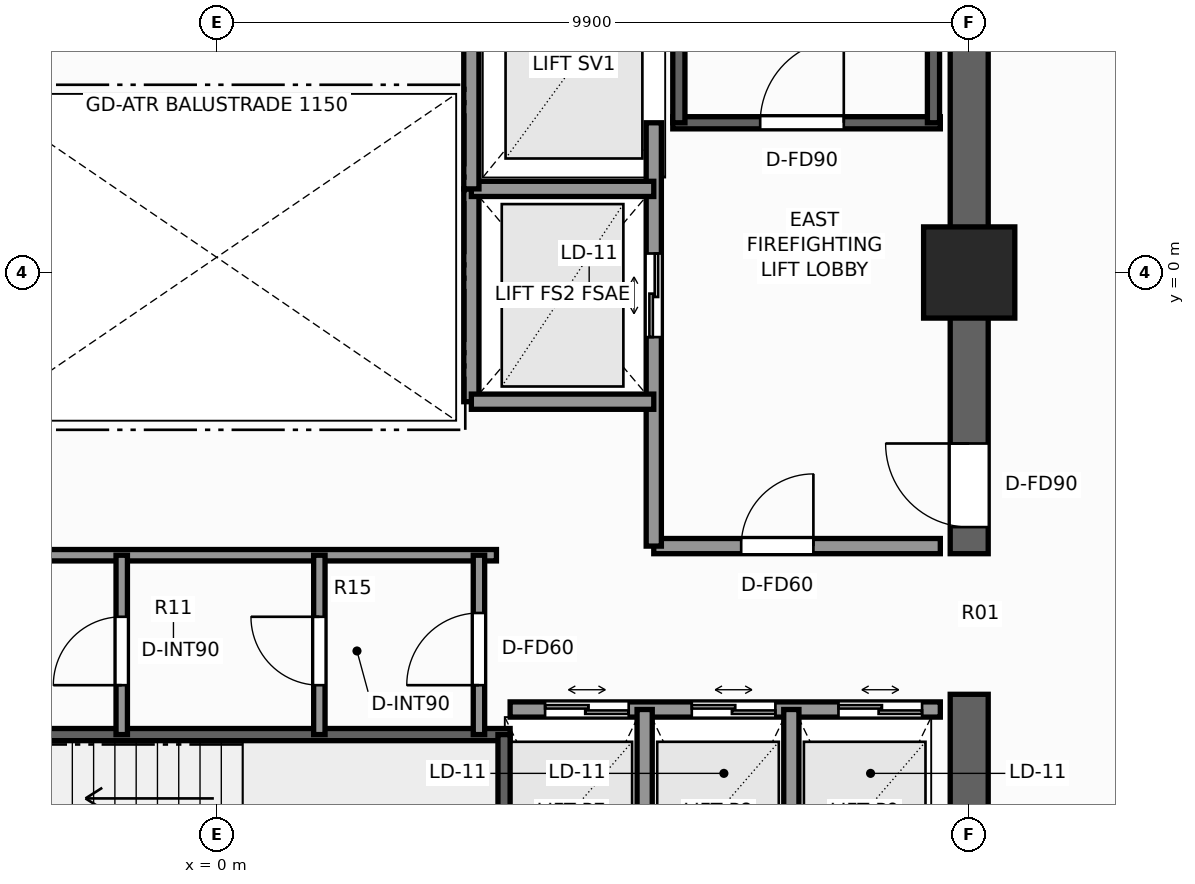
"""IFC4 building model, lengths in metres.
Left out: names, types, materials, properties, quantities, classifications, styles, units other than length and angle.
Written with IfcOpenShell. Run it as: python <this file> out.ifc"""

import sys

from ifc_helpers import new_model, si_unit, direction, frame, frame_2d, origin, origin_2d, place, context, subcontext, project, spatial, rectangle, extrude, element, fill, save


model = new_model("IFC4")
c1 = context("Model", 3, precision=1e-05, world=origin(), true_north=direction((0.0, 1.0)))
c2 = subcontext(c1, "Body", "Model", "MODEL_VIEW")
j1 = project(units=[si_unit("LENGTHUNIT", "METRE"), si_unit("PLANEANGLEUNIT", "RADIAN")], contexts=[c1])
p1 = place(None, origin())
s1 = spatial("IfcSite", under=j1, at=p1, CompositionType="ELEMENT")
p2 = place(p1, origin())
s2 = spatial("IfcBuilding", under=s1, at=p2, CompositionType="ELEMENT")
p3 = place(p2, frame((0.0, 0.0, 183.3)))
s3 = spatial("IfcBuildingStorey", under=s2, at=p3, CompositionType="ELEMENT", Elevation=183.3)
p4 = place(p3, frame((9.9, -9.65, 0.0), z_axis=(0.0, 0.0, 1.0), x_axis=(0.0, 1.0, 0.0)))
e1 = element("IfcWall", 1, at=p4, inside=s3, PredefinedType="SHEAR", context=c2, shape_type="SweptSolid", body=[
    extrude(rectangle(XDim=4.1, YDim=0.5, at=frame_2d((2.05, 0.0))), origin(), (0.0, 0.0, 1.0), 3.3),
])
p5 = place(p3, frame((9.9, -3.7, 0.0), z_axis=(0.0, 0.0, 1.0), x_axis=(0.0, 1.0, 0.0)))
e2 = element("IfcWall", 2, at=p5, inside=s3, PredefinedType="SHEAR", context=c2, shape_type="SweptSolid", body=[
    extrude(rectangle(XDim=13.35, YDim=0.5, at=frame_2d((6.675, 0.0))), origin(), (0.0, 0.0, 1.0), 3.3),
])
p6 = place(p5, frame((0.35, 0.0, 0.0)))
e3 = element("IfcOpeningElement", 3, at=p6, cuts=e2, PredefinedType="OPENING", context=c2, shape_type="SweptSolid", body=[
    extrude(rectangle(XDim=1.1, YDim=2.2, at=frame_2d((0.55, 1.1))), frame((0.0, 0.26, 0.0), z_axis=(0.0, -1.0, 0.0), x_axis=(1.0, 0.0, 0.0)), (0.0, 0.0, 1.0), 0.52),
])
p7 = place(p3, frame((9.9, 0.0, 0.0), z_axis=(0.0, 0.0, 1.0), x_axis=(1.0, 0.0, 0.0)))
e4 = element("IfcColumn", 4, at=p7, inside=s3, PredefinedType="COLUMN", context=c2, shape_type="SweptSolid", body=[
    extrude(rectangle(XDim=1.2, YDim=1.2, at=origin_2d()), origin(), (0.0, 0.0, 1.0), 3.3),
])
p8 = place(p3, frame((6.0, 1.97, 0.0), z_axis=(0.0, 0.0, 1.0), x_axis=(1.0, 0.0, 0.0)))
e5 = element("IfcWall", 5, at=p8, inside=s3, PredefinedType="SHEAR", context=c2, shape_type="SweptSolid", body=[
    extrude(rectangle(XDim=3.52, YDim=0.16, at=frame_2d((1.76, 0.0))), origin(), (0.0, 0.0, 1.0), 3.3),
])
p9 = place(p8, frame((1.15, 0.0, 0.0)))
e6 = element("IfcOpeningElement", 6, at=p9, cuts=e5, PredefinedType="OPENING", context=c2, shape_type="SweptSolid", body=[
    extrude(rectangle(XDim=1.1, YDim=2.2, at=frame_2d((0.55, 1.1))), frame((0.0, 0.09, 0.0), z_axis=(0.0, -1.0, 0.0), x_axis=(1.0, 0.0, 0.0)), (0.0, 0.0, 1.0), 0.18),
])
for number, where, z_axis, x_axis in (
    (7, (6.08, 1.97, 0.0), (0.0, 0.0, 1.0), (0.0, 1.0, 0.0)),
    (8, (9.43, 1.97, 0.0), (0.0, 0.0, 1.0), (0.0, 1.0, 0.0)),
):
    element("IfcWall", number, at=place(p3, frame(where, z_axis=z_axis, x_axis=x_axis)), inside=s3, PredefinedType="SHEAR", context=c2, shape_type="SweptSolid", body=[
        extrude(rectangle(XDim=7.56, YDim=0.16, at=frame_2d((3.78, 0.0))), origin(), (0.0, 0.0, 1.0), 3.3),
    ])
p10 = place(p3, frame((-3.86, -6.08, 0.0), z_axis=(0.0, 0.0, 1.0), x_axis=(1.0, 0.0, 0.0)))
e9 = element("IfcWall", 9, at=p10, inside=s3, PredefinedType="SHEAR", context=c2, shape_type="SweptSolid", body=[
    extrude(rectangle(XDim=7.72, YDim=0.16, at=frame_2d((3.86, 0.0))), origin(), (0.0, 0.0, 1.0), 3.3),
])
p11 = place(p3, frame((3.78, -9.43, 0.0), z_axis=(0.0, 0.0, 1.0), x_axis=(0.0, 1.0, 0.0)))
e10 = element("IfcWall", 10, at=p11, inside=s3, PredefinedType="SHEAR", context=c2, shape_type="SweptSolid", body=[
    extrude(rectangle(XDim=3.35, YDim=0.16, at=frame_2d((1.675, 0.0))), origin(), (0.0, 0.0, 1.0), 3.3),
])
p12 = place(p3, frame((5.75, -3.6, 0.0), z_axis=(0.0, 0.0, 1.0), x_axis=(1.0, 0.0, 0.0)))
e11 = element("IfcWall", 11, at=p12, inside=s3, PredefinedType="SOLIDWALL", context=c2, shape_type="SweptSolid", body=[
    extrude(rectangle(XDim=3.77, YDim=0.2, at=frame_2d((1.885, 0.0))), origin(), (0.0, 0.0, 1.0), 3.08),
])
p13 = place(p12, frame((1.15, 0.0, 0.0)))
e12 = element("IfcOpeningElement", 12, at=p13, cuts=e11, PredefinedType="OPENING", context=c2, shape_type="SweptSolid", body=[
    extrude(rectangle(XDim=0.95, YDim=2.06, at=frame_2d((0.475, 1.03))), frame((0.0, 0.11, 0.0), z_axis=(0.0, -1.0, 0.0), x_axis=(1.0, 0.0, 0.0)), (0.0, 0.0, 1.0), 0.22),
])
p14 = place(p3, frame((5.75, -3.6, 0.0), z_axis=(0.0, 0.0, 1.0), x_axis=(0.0, 1.0, 0.0)))
e13 = element("IfcWall", 13, at=p14, inside=s3, PredefinedType="SOLIDWALL", context=c2, shape_type="SweptSolid", body=[
    extrude(rectangle(XDim=5.57, YDim=0.2, at=frame_2d((2.785, 0.0))), origin(), (0.0, 0.0, 1.0), 2.715),
])
p15 = place(p14, frame((2.75, 0.0, 0.0)))
e14 = element("IfcOpeningElement", 14, at=p15, cuts=e13, PredefinedType="OPENING", context=c2, shape_type="SweptSolid", body=[
    extrude(rectangle(XDim=1.1, YDim=2.2, at=frame_2d((0.55, 1.1))), frame((0.0, 0.11, 0.0), z_axis=(0.0, -1.0, 0.0), x_axis=(1.0, 0.0, 0.0)), (0.0, 0.0, 1.0), 0.22),
])
p16 = place(p3, frame((3.35, -1.7, 0.0), z_axis=(0.0, 0.0, 1.0), x_axis=(0.0, 1.0, 0.0)))
e15 = element("IfcWall", 15, at=p16, inside=s3, PredefinedType="SOLIDWALL", context=c2, shape_type="SweptSolid", body=[
    extrude(rectangle(XDim=2.8, YDim=0.2, at=frame_2d((1.4, 0.0))), origin(), (0.0, 0.0, 1.0), 2.715),
])
for number, where, z_axis, x_axis in (
    (16, (3.35, -1.7, 0.0), (0.0, 0.0, 1.0), (1.0, 0.0, 0.0)),
    (17, (3.35, 1.1, 0.0), (0.0, 0.0, 1.0), (1.0, 0.0, 0.0)),
):
    element("IfcWall", number, at=place(p3, frame(where, z_axis=z_axis, x_axis=x_axis)), inside=s3, PredefinedType="SOLIDWALL", context=c2, shape_type="SweptSolid", body=[
        extrude(rectangle(XDim=2.4, YDim=0.2, at=frame_2d((1.2, 0.0))), origin(), (0.0, 0.0, 1.0), 3.08),
    ])
p17 = place(p3, frame((3.35, 1.1, 0.0), z_axis=(0.0, 0.0, 1.0), x_axis=(0.0, 1.0, 0.0)))
e18 = element("IfcWall", 18, at=p17, inside=s3, PredefinedType="SOLIDWALL", context=c2, shape_type="SweptSolid", body=[
    extrude(rectangle(XDim=3.2, YDim=0.2, at=frame_2d((1.6, 0.0))), origin(), (0.0, 0.0, 1.0), 2.715),
])
p18 = place(p3, frame((3.86, -5.75, 0.0), z_axis=(0.0, 0.0, 1.0), x_axis=(1.0, 0.0, 0.0)))
e19 = element("IfcWall", 19, at=p18, inside=s3, PredefinedType="SOLIDWALL", context=c2, shape_type="SweptSolid", body=[
    extrude(rectangle(XDim=5.66, YDim=0.2, at=frame_2d((2.83, 0.0))), origin(), (0.0, 0.0, 1.0), 3.08),
])
p19 = place(p18, frame((0.46, 0.0, 0.0)))
e20 = element("IfcOpeningElement", 20, at=p19, cuts=e19, PredefinedType="OPENING", context=c2, shape_type="SweptSolid", body=[
    extrude(rectangle(XDim=1.1, YDim=2.2, at=frame_2d((0.55, 1.1))), frame((0.0, 0.11, 0.0), z_axis=(0.0, -1.0, 0.0), x_axis=(1.0, 0.0, 0.0)), (0.0, 0.0, 1.0), 0.22),
])
p20 = place(p18, frame((2.39, 0.0, 0.0)))
e21 = element("IfcOpeningElement", 21, at=p20, cuts=e19, PredefinedType="OPENING", context=c2, shape_type="SweptSolid", body=[
    extrude(rectangle(XDim=1.1, YDim=2.2, at=frame_2d((0.55, 1.1))), frame((0.0, 0.11, 0.0), z_axis=(0.0, -1.0, 0.0), x_axis=(1.0, 0.0, 0.0)), (0.0, 0.0, 1.0), 0.22),
])
p21 = place(p18, frame((4.32, 0.0, 0.0)))
e22 = element("IfcOpeningElement", 22, at=p21, cuts=e19, PredefinedType="OPENING", context=c2, shape_type="SweptSolid", body=[
    extrude(rectangle(XDim=1.1, YDim=2.2, at=frame_2d((0.55, 1.1))), frame((0.0, 0.11, 0.0), z_axis=(0.0, -1.0, 0.0), x_axis=(1.0, 0.0, 0.0)), (0.0, 0.0, 1.0), 0.22),
])
for number, where, z_axis, x_axis in (
    (23, (5.63, -9.52, 0.0), (0.0, 0.0, 1.0), (0.0, 1.0, 0.0)),
    (24, (7.56, -9.52, 0.0), (0.0, 0.0, 1.0), (0.0, 1.0, 0.0)),
):
    element("IfcWall", number, at=place(p3, frame(where, z_axis=z_axis, x_axis=x_axis)), inside=s3, PredefinedType="SOLIDWALL", context=c2, shape_type="SweptSolid", body=[
        extrude(rectangle(XDim=3.77, YDim=0.2, at=frame_2d((1.885, 0.0))), origin(), (0.0, 0.0, 1.0), 3.08),
    ])
p22 = place(p3, frame((-3.68, -3.72, 0.0), z_axis=(0.0, 0.0, 1.0), x_axis=(1.0, 0.0, 0.0)))
e25 = element("IfcWall", 25, at=p22, inside=s3, PredefinedType="PARTITIONING", context=c2, shape_type="SweptSolid", body=[
    extrude(rectangle(XDim=7.36, YDim=0.15, at=frame_2d((3.68, 0.0))), origin(), (0.0, 0.0, 1.0), 3.08),
])
p23 = place(p3, frame((3.45, -6.08, 0.0), z_axis=(0.0, 0.0, 1.0), x_axis=(0.0, 1.0, 0.0)))
e26 = element("IfcWall", 26, at=p23, inside=s3, PredefinedType="PARTITIONING", context=c2, shape_type="SweptSolid", body=[
    extrude(rectangle(XDim=2.36, YDim=0.15, at=frame_2d((1.18, 0.0))), origin(), (0.0, 0.0, 1.0), 3.08),
])
p24 = place(p23, frame((0.65, 0.0, 0.0)))
e27 = element("IfcOpeningElement", 27, at=p24, cuts=e26, PredefinedType="OPENING", context=c2, shape_type="SweptSolid", body=[
    extrude(rectangle(XDim=0.95, YDim=2.06, at=frame_2d((0.475, 1.03))), frame((0.0, 0.085, 0.0), z_axis=(0.0, -1.0, 0.0), x_axis=(1.0, 0.0, 0.0)), (0.0, 0.0, 1.0), 0.17),
])
p25 = place(p3, frame((1.35, -6.08, 0.0), z_axis=(0.0, 0.0, 1.0), x_axis=(0.0, 1.0, 0.0)))
e28 = element("IfcWall", 28, at=p25, inside=s3, PredefinedType="PARTITIONING", context=c2, shape_type="SweptSolid", body=[
    extrude(rectangle(XDim=2.36, YDim=0.15, at=frame_2d((1.18, 0.0))), origin(), (0.0, 0.0, 1.0), 3.08),
])
p26 = place(p25, frame((0.65, 0.0, 0.0)))
e29 = element("IfcOpeningElement", 29, at=p26, cuts=e28, PredefinedType="OPENING", context=c2, shape_type="SweptSolid", body=[
    extrude(rectangle(XDim=0.9, YDim=2.06, at=frame_2d((0.45, 1.03))), frame((0.0, 0.085, 0.0), z_axis=(0.0, -1.0, 0.0), x_axis=(1.0, 0.0, 0.0)), (0.0, 0.0, 1.0), 0.17),
])
p27 = place(p3, frame((-1.25, -6.08, 0.0), z_axis=(0.0, 0.0, 1.0), x_axis=(0.0, 1.0, 0.0)))
e30 = element("IfcWall", 30, at=p27, inside=s3, PredefinedType="PARTITIONING", context=c2, shape_type="SweptSolid", body=[
    extrude(rectangle(XDim=2.36, YDim=0.15, at=frame_2d((1.18, 0.0))), origin(), (0.0, 0.0, 1.0), 3.08),
])
p28 = place(p27, frame((0.65, 0.0, 0.0)))
e31 = element("IfcOpeningElement", 31, at=p28, cuts=e30, PredefinedType="OPENING", context=c2, shape_type="SweptSolid", body=[
    extrude(rectangle(XDim=0.9, YDim=2.06, at=frame_2d((0.45, 1.03))), frame((0.0, 0.085, 0.0), z_axis=(0.0, -1.0, 0.0), x_axis=(1.0, 0.0, 0.0)), (0.0, 0.0, 1.0), 0.17),
])
p29 = place(p9, origin())
e32 = element("IfcDoor", 32, at=p29, inside=s3, OperationType="SINGLE_SWING_RIGHT", PredefinedType="DOOR", context=c2, shape_type="SweptSolid", body=[
    extrude(rectangle(XDim=1.1, YDim=2.2, at=frame_2d((0.55, 1.1))), frame((0.0, 0.025, 0.0), z_axis=(0.0, -1.0, 0.0), x_axis=(1.0, 0.0, 0.0)), (0.0, 0.0, 1.0), 0.05),
])
fill(e6, e32)
p30 = place(p6, origin())
e33 = element("IfcDoor", 33, at=p30, inside=s3, OperationType="SINGLE_SWING_RIGHT", PredefinedType="DOOR", context=c2, shape_type="SweptSolid", body=[
    extrude(rectangle(XDim=1.1, YDim=2.2, at=frame_2d((0.55, 1.1))), frame((0.0, 0.025, 0.0), z_axis=(0.0, -1.0, 0.0), x_axis=(1.0, 0.0, 0.0)), (0.0, 0.0, 1.0), 0.05),
])
fill(e3, e33)
p31 = place(p15, origin())
e34 = element("IfcDoor", 34, at=p31, inside=s3, OperationType="DOUBLE_DOOR_SLIDING", PredefinedType="DOOR", context=c2, shape_type="SweptSolid", body=[
    extrude(rectangle(XDim=1.1, YDim=2.2, at=frame_2d((0.55, 1.1))), frame((0.0, 0.025, 0.0), z_axis=(0.0, -1.0, 0.0), x_axis=(1.0, 0.0, 0.0)), (0.0, 0.0, 1.0), 0.05),
])
fill(e14, e34)
p32 = place(p19, origin())
e35 = element("IfcDoor", 35, at=p32, inside=s3, OperationType="DOUBLE_DOOR_SLIDING", PredefinedType="DOOR", context=c2, shape_type="SweptSolid", body=[
    extrude(rectangle(XDim=1.1, YDim=2.2, at=frame_2d((0.55, 1.1))), frame((0.0, 0.025, 0.0), z_axis=(0.0, -1.0, 0.0), x_axis=(1.0, 0.0, 0.0)), (0.0, 0.0, 1.0), 0.05),
])
fill(e20, e35)
p33 = place(p20, origin())
e36 = element("IfcDoor", 36, at=p33, inside=s3, OperationType="DOUBLE_DOOR_SLIDING", PredefinedType="DOOR", context=c2, shape_type="SweptSolid", body=[
    extrude(rectangle(XDim=1.1, YDim=2.2, at=frame_2d((0.55, 1.1))), frame((0.0, 0.025, 0.0), z_axis=(0.0, -1.0, 0.0), x_axis=(1.0, 0.0, 0.0)), (0.0, 0.0, 1.0), 0.05),
])
fill(e21, e36)
p34 = place(p21, origin())
e37 = element("IfcDoor", 37, at=p34, inside=s3, OperationType="DOUBLE_DOOR_SLIDING", PredefinedType="DOOR", context=c2, shape_type="SweptSolid", body=[
    extrude(rectangle(XDim=1.1, YDim=2.2, at=frame_2d((0.55, 1.1))), frame((0.0, 0.025, 0.0), z_axis=(0.0, -1.0, 0.0), x_axis=(1.0, 0.0, 0.0)), (0.0, 0.0, 1.0), 0.05),
])
fill(e22, e37)
p35 = place(p13, origin())
e38 = element("IfcDoor", 38, at=p35, inside=s3, OperationType="SINGLE_SWING_RIGHT", PredefinedType="DOOR", context=c2, shape_type="SweptSolid", body=[
    extrude(rectangle(XDim=0.95, YDim=2.06, at=frame_2d((0.475, 1.03))), frame((0.0, 0.025, 0.0), z_axis=(0.0, -1.0, 0.0), x_axis=(1.0, 0.0, 0.0)), (0.0, 0.0, 1.0), 0.05),
])
fill(e12, e38)
p36 = place(p24, origin())
e39 = element("IfcDoor", 39, at=p36, inside=s3, OperationType="SINGLE_SWING_LEFT", PredefinedType="DOOR", context=c2, shape_type="SweptSolid", body=[
    extrude(rectangle(XDim=0.95, YDim=2.06, at=frame_2d((0.475, 1.03))), frame((0.0, 0.025, 0.0), z_axis=(0.0, -1.0, 0.0), x_axis=(1.0, 0.0, 0.0)), (0.0, 0.0, 1.0), 0.05),
])
fill(e27, e39)
p37 = place(p26, origin())
e40 = element("IfcDoor", 40, at=p37, inside=s3, OperationType="SINGLE_SWING_RIGHT", PredefinedType="DOOR", context=c2, shape_type="SweptSolid", body=[
    extrude(rectangle(XDim=0.9, YDim=2.06, at=frame_2d((0.45, 1.03))), frame((0.0, 0.025, 0.0), z_axis=(0.0, -1.0, 0.0), x_axis=(1.0, 0.0, 0.0)), (0.0, 0.0, 1.0), 0.05),
])
fill(e29, e40)
p38 = place(p28, origin())
e41 = element("IfcDoor", 41, at=p38, inside=s3, OperationType="SINGLE_SWING_LEFT", PredefinedType="DOOR", context=c2, shape_type="SweptSolid", body=[
    extrude(rectangle(XDim=0.9, YDim=2.06, at=frame_2d((0.45, 1.03))), frame((0.0, 0.025, 0.0), z_axis=(0.0, -1.0, 0.0), x_axis=(1.0, 0.0, 0.0)), (0.0, 0.0, 1.0), 0.05),
])
fill(e31, e41)
save(model, sys.argv[1])
